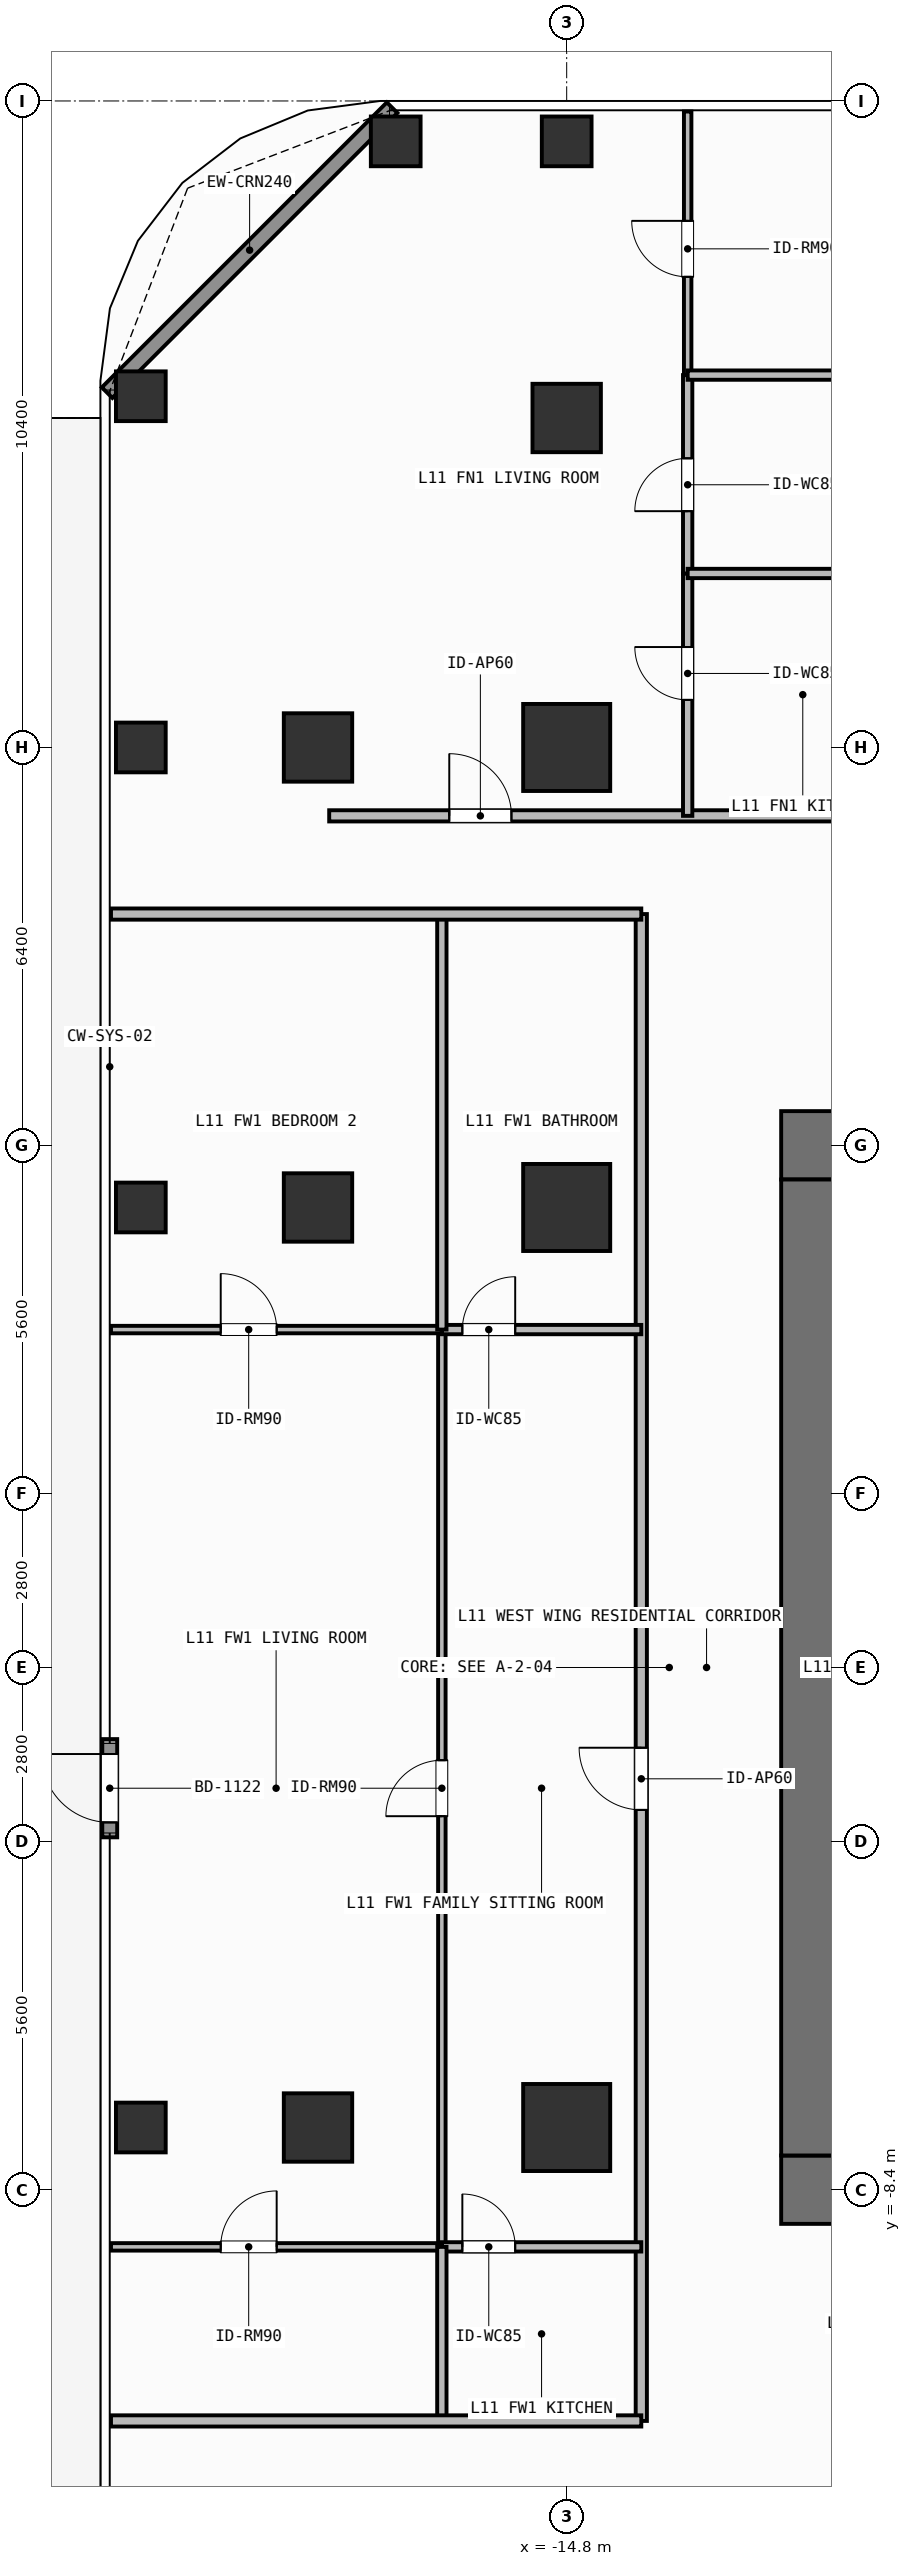
"""IFC4 building model, lengths in metres.
Left out: names, types, materials, properties, quantities, classifications, styles, units other than length and angle.
Written with IfcOpenShell. Run it as: python <this file> out.ifc"""

import sys

from ifc_helpers import new_model, si_unit, direction, frame, frame_2d, origin, origin_2d, place, context, subcontext, project, spatial, rectangle, hollow_rectangle, extrude, element, fill, save


model = new_model("IFC4")
c1 = context("Model", 3, precision=1e-05, world=origin(), true_north=direction((0.0, 1.0)))
c2 = subcontext(c1, "Body", "Model", "MODEL_VIEW")
j1 = project(units=[si_unit("LENGTHUNIT", "METRE"), si_unit("PLANEANGLEUNIT", "RADIAN")], contexts=[c1])
p1 = place(None, origin())
s1 = spatial("IfcSite", under=j1, at=p1, CompositionType="ELEMENT")
p2 = place(p1, origin())
s2 = spatial("IfcBuilding", under=s1, at=p2, CompositionType="ELEMENT")
p3 = place(p2, frame((0.0, 0.0, 42.3)))
s3 = spatial("IfcBuildingStorey", under=s2, at=p3, CompositionType="ELEMENT", Elevation=42.3)
for number, where, z_axis, x_axis in (
    (1, (-11.35, -8.4, 0.0), (0.0, 0.0, 1.0), (1.0, 0.0, 0.0)),
    (2, (-11.35, 8.4, 0.0), (0.0, 0.0, 1.0), (1.0, 0.0, 0.0)),
):
    element("IfcWall", number, at=place(p3, frame(where, z_axis=z_axis, x_axis=x_axis)), inside=s3, PredefinedType="SHEAR", context=c2, shape_type="SweptSolid", body=[
        extrude(rectangle(XDim=1.65, YDim=1.1, at=frame_2d((0.825, 0.0))), origin(), (0.0, 0.0, 1.0), 3.9),
    ])
p4 = place(p3, frame((-10.8, -7.85, 0.0), z_axis=(0.0, 0.0, 1.0), x_axis=(0.0, 1.0, 0.0)))
e3 = element("IfcWall", 3, at=p4, inside=s3, PredefinedType="SHEAR", context=c2, shape_type="SweptSolid", body=[
    extrude(rectangle(XDim=15.7, YDim=1.1, at=frame_2d((7.85, 0.0))), origin(), (0.0, 0.0, 1.0), 3.9),
])
for number, where, z_axis, x_axis in (
    (4, (-14.8, 14.8, 0.0), (0.0, 0.0, 1.0), (1.0, 0.0, 0.0)),
    (5, (-14.8, -7.4, 0.0), (0.0, 0.0, 1.0), (1.0, 0.0, 0.0)),
    (6, (-14.8, 7.4, 0.0), (0.0, 0.0, 1.0), (1.0, 0.0, 0.0)),
):
    element("IfcColumn", number, at=place(p3, frame(where, z_axis=z_axis, x_axis=x_axis)), inside=s3, PredefinedType="COLUMN", context=c2, shape_type="SweptSolid", body=[
        extrude(rectangle(XDim=1.4, YDim=1.4, at=origin_2d()), origin(), (0.0, 0.0, 1.0), 3.9),
    ])
for number, where, z_axis, x_axis in (
    (7, (-18.8, -7.4, 0.0), (0.0, 0.0, 1.0), (1.0, 0.0, 0.0)),
    (8, (-18.8, 7.4, 0.0), (0.0, 0.0, 1.0), (1.0, 0.0, 0.0)),
    (9, (-18.8, 14.8, 0.0), (0.0, 0.0, 1.0), (1.0, 0.0, 0.0)),
    (10, (-14.8, 20.1, 0.0), (0.0, 0.0, 1.0), (1.0, 0.0, 0.0)),
):
    element("IfcColumn", number, at=place(p3, frame(where, z_axis=z_axis, x_axis=x_axis)), inside=s3, PredefinedType="COLUMN", context=c2, shape_type="SweptSolid", body=[
        extrude(rectangle(XDim=1.1, YDim=1.1, at=origin_2d()), origin(), (0.0, 0.0, 1.0), 3.9),
    ])
for number, where, z_axis, x_axis in (
    (11, (-17.55, 24.55, 0.0), (0.0, 0.0, 1.0), (1.0, 0.0, 0.0)),
    (12, (-21.65, 20.45, 0.0), (0.0, 0.0, 1.0), (1.0, 0.0, 0.0)),
    (13, (-14.8, 24.55, 0.0), (0.0, 0.0, 1.0), (1.0, 0.0, 0.0)),
    (14, (-21.65, -7.4, 0.0), (0.0, 0.0, 1.0), (1.0, 0.0, 0.0)),
    (15, (-21.65, 7.4, 0.0), (0.0, 0.0, 1.0), (1.0, 0.0, 0.0)),
    (16, (-21.65, 14.8, 0.0), (0.0, 0.0, 1.0), (1.0, 0.0, 0.0)),
):
    element("IfcColumn", number, at=place(p3, frame(where, z_axis=z_axis, x_axis=x_axis)), inside=s3, PredefinedType="COLUMN", context=c2, shape_type="SweptSolid", body=[
        extrude(hollow_rectangle(XDim=0.8, YDim=0.8, WallThickness=0.036, at=origin_2d()), origin(), (0.0, 0.0, 1.0), 3.9),
    ])
p5 = place(p3, frame((-22.15, -2.732, 0.0), z_axis=(0.0, 0.0, 1.0), x_axis=(0.0, 1.0, 0.0)))
e17 = element("IfcWall", 17, at=p5, inside=s3, PredefinedType="SOLIDWALL", context=c2, shape_type="SweptSolid", body=[
    extrude(rectangle(XDim=1.58, YDim=0.24, at=frame_2d((0.79, 0.0))), origin(), (0.0, 0.0, 1.0), 3.68),
])
p6 = place(p5, frame((0.24, 0.0, 0.0)))
e18 = element("IfcOpeningElement", 18, at=p6, cuts=e17, PredefinedType="OPENING", context=c2, shape_type="SweptSolid", body=[
    extrude(rectangle(XDim=1.1, YDim=2.2, at=frame_2d((0.55, 1.1))), frame((0.0, 0.13, 0.0), z_axis=(0.0, -1.0, 0.0), x_axis=(1.0, 0.0, 0.0)), (0.0, 0.0, 1.0), 0.26),
])
p7 = place(p3, frame((-22.192, 20.508, 0.0), z_axis=(0.0, 0.0, 1.0), x_axis=(0.707106781187, 0.707106781187, 0.0)))
e19 = element("IfcWall", 19, at=p7, inside=s3, PredefinedType="SOLIDWALL", context=c2, shape_type="SweptSolid", body=[
    extrude(rectangle(XDim=6.484, YDim=0.24, at=frame_2d((3.242, 0.0))), origin(), (0.0, 0.0, 1.0), 3.68),
])
p8 = place(p3, frame((-18.62, 13.7, 0.0), z_axis=(0.0, 0.0, 1.0), x_axis=(1.0, 0.0, 0.0)))
e20 = element("IfcWall", 20, at=p8, inside=s3, PredefinedType="PARTITIONING", context=c2, shape_type="SweptSolid", body=[
    extrude(rectangle(XDim=9.469, YDim=0.18, at=frame_2d((4.735, 0.0))), origin(), (0.0, 0.0, 1.0), 3.68),
])
p9 = place(p8, frame((1.931, 0.0, 0.0)))
e21 = element("IfcOpeningElement", 21, at=p9, cuts=e20, PredefinedType="OPENING", context=c2, shape_type="SweptSolid", body=[
    extrude(rectangle(XDim=1.0, YDim=2.2, at=frame_2d((0.5, 1.1))), frame((0.0, 0.1, 0.0), z_axis=(0.0, -1.0, 0.0), x_axis=(1.0, 0.0, 0.0)), (0.0, 0.0, 1.0), 0.2),
])
p10 = place(p3, frame((-12.854, 13.7, 0.0), z_axis=(0.0, 0.0, 1.0), x_axis=(0.0, 1.0, 0.0)))
e22 = element("IfcWall", 22, at=p10, inside=s3, PredefinedType="PARTITIONING", context=c2, shape_type="SweptSolid", body=[
    extrude(rectangle(XDim=3.899, YDim=0.15, at=frame_2d((1.95, 0.0))), origin(), (0.0, 0.0, 1.0), 3.68),
])
p11 = place(p10, frame((1.865, 0.0, 0.0)))
e23 = element("IfcOpeningElement", 23, at=p11, cuts=e22, PredefinedType="OPENING", context=c2, shape_type="SweptSolid", body=[
    extrude(rectangle(XDim=0.85, YDim=2.1, at=frame_2d((0.425, 1.05))), frame((0.0, 0.085, 0.0), z_axis=(0.0, -1.0, 0.0), x_axis=(1.0, 0.0, 0.0)), (0.0, 0.0, 1.0), 0.17),
])
p12 = place(p3, frame((-12.854, 17.599, 0.0), z_axis=(0.0, 0.0, 1.0), x_axis=(0.0, 1.0, 0.0)))
e24 = element("IfcWall", 24, at=p12, inside=s3, PredefinedType="PARTITIONING", context=c2, shape_type="SweptSolid", body=[
    extrude(rectangle(XDim=3.191, YDim=0.15, at=frame_2d((1.595, 0.0))), origin(), (0.0, 0.0, 1.0), 3.68),
])
p13 = place(p12, frame((1.002, 0.0, 0.0)))
e25 = element("IfcOpeningElement", 25, at=p13, cuts=e24, PredefinedType="OPENING", context=c2, shape_type="SweptSolid", body=[
    extrude(rectangle(XDim=0.85, YDim=2.1, at=frame_2d((0.425, 1.05))), frame((0.0, 0.085, 0.0), z_axis=(0.0, -1.0, 0.0), x_axis=(1.0, 0.0, 0.0)), (0.0, 0.0, 1.0), 0.17),
])
p14 = place(p3, frame((-12.854, 20.79, 0.0), z_axis=(0.0, 0.0, 1.0), x_axis=(0.0, 1.0, 0.0)))
e26 = element("IfcWall", 26, at=p14, inside=s3, PredefinedType="PARTITIONING", context=c2, shape_type="SweptSolid", body=[
    extrude(rectangle(XDim=4.24, YDim=0.12, at=frame_2d((2.12, 0.0))), origin(), (0.0, 0.0, 1.0), 3.68),
])
p15 = place(p14, frame((1.581, 0.0, 0.0)))
e27 = element("IfcOpeningElement", 27, at=p15, cuts=e26, PredefinedType="OPENING", context=c2, shape_type="SweptSolid", body=[
    extrude(rectangle(XDim=0.9, YDim=2.1, at=frame_2d((0.45, 1.05))), frame((0.0, 0.07, 0.0), z_axis=(0.0, -1.0, 0.0), x_axis=(1.0, 0.0, 0.0)), (0.0, 0.0, 1.0), 0.14),
])
p16 = place(p3, frame((-13.6, -12.12, 0.0), z_axis=(0.0, 0.0, 1.0), x_axis=(0.0, 1.0, 0.0)))
e28 = element("IfcWall", 28, at=p16, inside=s3, PredefinedType="PARTITIONING", context=c2, shape_type="SweptSolid", body=[
    extrude(rectangle(XDim=24.24, YDim=0.18, at=frame_2d((12.12, 0.0))), origin(), (0.0, 0.0, 1.0), 3.68),
])
p17 = place(p16, frame((9.829, 0.0, 0.0)))
e29 = element("IfcOpeningElement", 29, at=p17, cuts=e28, PredefinedType="OPENING", context=c2, shape_type="SweptSolid", body=[
    extrude(rectangle(XDim=1.0, YDim=2.2, at=frame_2d((0.5, 1.1))), frame((0.0, 0.1, 0.0), z_axis=(0.0, -1.0, 0.0), x_axis=(1.0, 0.0, 0.0)), (0.0, 0.0, 1.0), 0.2),
])
p18 = place(p3, frame((-16.808, -9.32, 0.0), z_axis=(0.0, 0.0, 1.0), x_axis=(0.0, 1.0, 0.0)))
e30 = element("IfcWall", 30, at=p18, inside=s3, PredefinedType="PARTITIONING", context=c2, shape_type="SweptSolid", body=[
    extrude(rectangle(XDim=14.756, YDim=0.12, at=frame_2d((7.378, 0.0))), origin(), (0.0, 0.0, 1.0), 3.68),
])
p19 = place(p18, frame((6.928, 0.0, 0.0)))
e31 = element("IfcOpeningElement", 31, at=p19, cuts=e30, PredefinedType="OPENING", context=c2, shape_type="SweptSolid", body=[
    extrude(rectangle(XDim=0.9, YDim=2.1, at=frame_2d((0.45, 1.05))), frame((0.0, 0.07, 0.0), z_axis=(0.0, -1.0, 0.0), x_axis=(1.0, 0.0, 0.0)), (0.0, 0.0, 1.0), 0.14),
])
p20 = place(p3, frame((-16.808, 5.436, 0.0), z_axis=(0.0, 0.0, 1.0), x_axis=(1.0, 0.0, 0.0)))
e32 = element("IfcWall", 32, at=p20, inside=s3, PredefinedType="PARTITIONING", context=c2, shape_type="SweptSolid", body=[
    extrude(rectangle(XDim=3.208, YDim=0.15, at=frame_2d((1.604, 0.0))), origin(), (0.0, 0.0, 1.0), 3.68),
])
p21 = place(p20, frame((0.33, 0.0, 0.0)))
e33 = element("IfcOpeningElement", 33, at=p21, cuts=e32, PredefinedType="OPENING", context=c2, shape_type="SweptSolid", body=[
    extrude(rectangle(XDim=0.85, YDim=2.1, at=frame_2d((0.425, 1.05))), frame((0.0, 0.085, 0.0), z_axis=(0.0, -1.0, 0.0), x_axis=(1.0, 0.0, 0.0)), (0.0, 0.0, 1.0), 0.17),
])
p22 = place(p3, frame((-16.808, -9.32, 0.0), z_axis=(0.0, 0.0, 1.0), x_axis=(1.0, 0.0, 0.0)))
e34 = element("IfcWall", 34, at=p22, inside=s3, PredefinedType="PARTITIONING", context=c2, shape_type="SweptSolid", body=[
    extrude(rectangle(XDim=3.208, YDim=0.15, at=frame_2d((1.604, 0.0))), origin(), (0.0, 0.0, 1.0), 3.68),
])
p23 = place(p22, frame((0.33, 0.0, 0.0)))
e35 = element("IfcOpeningElement", 35, at=p23, cuts=e34, PredefinedType="OPENING", context=c2, shape_type="SweptSolid", body=[
    extrude(rectangle(XDim=0.85, YDim=2.1, at=frame_2d((0.425, 1.05))), frame((0.0, 0.085, 0.0), z_axis=(0.0, -1.0, 0.0), x_axis=(1.0, 0.0, 0.0)), (0.0, 0.0, 1.0), 0.17),
])
p24 = place(p3, frame((-22.13, -9.32, 0.0), z_axis=(0.0, 0.0, 1.0), x_axis=(1.0, 0.0, 0.0)))
e36 = element("IfcWall", 36, at=p24, inside=s3, PredefinedType="PARTITIONING", context=c2, shape_type="SweptSolid", body=[
    extrude(rectangle(XDim=5.322, YDim=0.12, at=frame_2d((2.661, 0.0))), origin(), (0.0, 0.0, 1.0), 3.68),
])
p25 = place(p24, frame((1.765, 0.0, 0.0)))
e37 = element("IfcOpeningElement", 37, at=p25, cuts=e36, PredefinedType="OPENING", context=c2, shape_type="SweptSolid", body=[
    extrude(rectangle(XDim=0.9, YDim=2.1, at=frame_2d((0.45, 1.05))), frame((0.0, 0.07, 0.0), z_axis=(0.0, -1.0, 0.0), x_axis=(1.0, 0.0, 0.0)), (0.0, 0.0, 1.0), 0.14),
])
p26 = place(p3, frame((-22.13, 5.436, 0.0), z_axis=(0.0, 0.0, 1.0), x_axis=(1.0, 0.0, 0.0)))
e38 = element("IfcWall", 38, at=p26, inside=s3, PredefinedType="PARTITIONING", context=c2, shape_type="SweptSolid", body=[
    extrude(rectangle(XDim=5.322, YDim=0.12, at=frame_2d((2.661, 0.0))), origin(), (0.0, 0.0, 1.0), 3.68),
])
p27 = place(p26, frame((1.765, 0.0, 0.0)))
e39 = element("IfcOpeningElement", 39, at=p27, cuts=e38, PredefinedType="OPENING", context=c2, shape_type="SweptSolid", body=[
    extrude(rectangle(XDim=0.9, YDim=2.1, at=frame_2d((0.45, 1.05))), frame((0.0, 0.07, 0.0), z_axis=(0.0, -1.0, 0.0), x_axis=(1.0, 0.0, 0.0)), (0.0, 0.0, 1.0), 0.14),
])
for number, where, z_axis, x_axis in (
    (40, (-12.854, 17.599, 0.0), (0.0, 0.0, 1.0), (1.0, 0.0, 0.0)),
    (41, (-12.854, 20.79, 0.0), (0.0, 0.0, 1.0), (1.0, 0.0, 0.0)),
):
    element("IfcWall", number, at=place(p3, frame(where, z_axis=z_axis, x_axis=x_axis)), inside=s3, PredefinedType="PARTITIONING", context=c2, shape_type="SweptSolid", body=[
        extrude(rectangle(XDim=3.703, YDim=0.15, at=frame_2d((1.852, 0.0))), origin(), (0.0, 0.0, 1.0), 3.68),
    ])
p28 = place(p3, frame((-16.808, -12.12, 0.0), z_axis=(0.0, 0.0, 1.0), x_axis=(0.0, 1.0, 0.0)))
e42 = element("IfcWall", 42, at=p28, inside=s3, PredefinedType="PARTITIONING", context=c2, shape_type="SweptSolid", body=[
    extrude(rectangle(XDim=2.8, YDim=0.15, at=frame_2d((1.4, 0.0))), origin(), (0.0, 0.0, 1.0), 3.68),
])
p29 = place(p3, frame((-16.808, 5.436, 0.0), z_axis=(0.0, 0.0, 1.0), x_axis=(0.0, 1.0, 0.0)))
e43 = element("IfcWall", 43, at=p29, inside=s3, PredefinedType="PARTITIONING", context=c2, shape_type="SweptSolid", body=[
    extrude(rectangle(XDim=6.684, YDim=0.15, at=frame_2d((3.342, 0.0))), origin(), (0.0, 0.0, 1.0), 3.68),
])
for number, where, z_axis, x_axis in (
    (44, (-22.13, -12.12, 0.0), (0.0, 0.0, 1.0), (1.0, 0.0, 0.0)),
    (45, (-22.13, 12.12, 0.0), (0.0, 0.0, 1.0), (1.0, 0.0, 0.0)),
):
    element("IfcWall", number, at=place(p3, frame(where, z_axis=z_axis, x_axis=x_axis)), inside=s3, PredefinedType="PARTITIONING", context=c2, shape_type="SweptSolid", body=[
        extrude(rectangle(XDim=8.53, YDim=0.18, at=frame_2d((4.265, 0.0))), origin(), (0.0, 0.0, 1.0), 3.68),
    ])
p30 = place(p6, origin())
e46 = element("IfcDoor", 46, at=p30, inside=s3, OperationType="SINGLE_SWING_RIGHT", PredefinedType="DOOR", context=c2, shape_type="SweptSolid", body=[
    extrude(rectangle(XDim=1.1, YDim=2.2, at=frame_2d((0.55, 1.1))), frame((0.0, 0.025, 0.0), z_axis=(0.0, -1.0, 0.0), x_axis=(1.0, 0.0, 0.0)), (0.0, 0.0, 1.0), 0.05),
])
fill(e18, e46)
p31 = place(p9, origin())
e47 = element("IfcDoor", 47, at=p31, inside=s3, OperationType="SINGLE_SWING_LEFT", PredefinedType="DOOR", context=c2, shape_type="SweptSolid", body=[
    extrude(rectangle(XDim=1.0, YDim=2.2, at=frame_2d((0.5, 1.1))), frame((0.0, 0.025, 0.0), z_axis=(0.0, -1.0, 0.0), x_axis=(1.0, 0.0, 0.0)), (0.0, 0.0, 1.0), 0.05),
])
fill(e21, e47)
p32 = place(p11, origin())
e48 = element("IfcDoor", 48, at=p32, inside=s3, OperationType="SINGLE_SWING_RIGHT", PredefinedType="DOOR", context=c2, shape_type="SweptSolid", body=[
    extrude(rectangle(XDim=0.85, YDim=2.1, at=frame_2d((0.425, 1.05))), frame((0.0, 0.025, 0.0), z_axis=(0.0, -1.0, 0.0), x_axis=(1.0, 0.0, 0.0)), (0.0, 0.0, 1.0), 0.05),
])
fill(e23, e48)
p33 = place(p13, origin())
e49 = element("IfcDoor", 49, at=p33, inside=s3, OperationType="SINGLE_SWING_LEFT", PredefinedType="DOOR", context=c2, shape_type="SweptSolid", body=[
    extrude(rectangle(XDim=0.85, YDim=2.1, at=frame_2d((0.425, 1.05))), frame((0.0, 0.025, 0.0), z_axis=(0.0, -1.0, 0.0), x_axis=(1.0, 0.0, 0.0)), (0.0, 0.0, 1.0), 0.05),
])
fill(e25, e49)
p34 = place(p15, origin())
e50 = element("IfcDoor", 50, at=p34, inside=s3, OperationType="SINGLE_SWING_RIGHT", PredefinedType="DOOR", context=c2, shape_type="SweptSolid", body=[
    extrude(rectangle(XDim=0.9, YDim=2.1, at=frame_2d((0.45, 1.05))), frame((0.0, 0.025, 0.0), z_axis=(0.0, -1.0, 0.0), x_axis=(1.0, 0.0, 0.0)), (0.0, 0.0, 1.0), 0.05),
])
fill(e27, e50)
p35 = place(p17, origin())
e51 = element("IfcDoor", 51, at=p35, inside=s3, OperationType="SINGLE_SWING_RIGHT", PredefinedType="DOOR", context=c2, shape_type="SweptSolid", body=[
    extrude(rectangle(XDim=1.0, YDim=2.2, at=frame_2d((0.5, 1.1))), frame((0.0, 0.025, 0.0), z_axis=(0.0, -1.0, 0.0), x_axis=(1.0, 0.0, 0.0)), (0.0, 0.0, 1.0), 0.05),
])
fill(e29, e51)
p36 = place(p19, origin())
e52 = element("IfcDoor", 52, at=p36, inside=s3, OperationType="SINGLE_SWING_LEFT", PredefinedType="DOOR", context=c2, shape_type="SweptSolid", body=[
    extrude(rectangle(XDim=0.9, YDim=2.1, at=frame_2d((0.45, 1.05))), frame((0.0, 0.025, 0.0), z_axis=(0.0, -1.0, 0.0), x_axis=(1.0, 0.0, 0.0)), (0.0, 0.0, 1.0), 0.05),
])
fill(e31, e52)
p37 = place(p21, origin())
e53 = element("IfcDoor", 53, at=p37, inside=s3, OperationType="SINGLE_SWING_RIGHT", PredefinedType="DOOR", context=c2, shape_type="SweptSolid", body=[
    extrude(rectangle(XDim=0.85, YDim=2.1, at=frame_2d((0.425, 1.05))), frame((0.0, 0.025, 0.0), z_axis=(0.0, -1.0, 0.0), x_axis=(1.0, 0.0, 0.0)), (0.0, 0.0, 1.0), 0.05),
])
fill(e33, e53)
p38 = place(p23, origin())
e54 = element("IfcDoor", 54, at=p38, inside=s3, OperationType="SINGLE_SWING_LEFT", PredefinedType="DOOR", context=c2, shape_type="SweptSolid", body=[
    extrude(rectangle(XDim=0.85, YDim=2.1, at=frame_2d((0.425, 1.05))), frame((0.0, 0.025, 0.0), z_axis=(0.0, -1.0, 0.0), x_axis=(1.0, 0.0, 0.0)), (0.0, 0.0, 1.0), 0.05),
])
fill(e35, e54)
p39 = place(p25, origin())
e55 = element("IfcDoor", 55, at=p39, inside=s3, OperationType="SINGLE_SWING_RIGHT", PredefinedType="DOOR", context=c2, shape_type="SweptSolid", body=[
    extrude(rectangle(XDim=0.9, YDim=2.1, at=frame_2d((0.45, 1.05))), frame((0.0, 0.025, 0.0), z_axis=(0.0, -1.0, 0.0), x_axis=(1.0, 0.0, 0.0)), (0.0, 0.0, 1.0), 0.05),
])
fill(e37, e55)
p40 = place(p27, origin())
e56 = element("IfcDoor", 56, at=p40, inside=s3, OperationType="SINGLE_SWING_LEFT", PredefinedType="DOOR", context=c2, shape_type="SweptSolid", body=[
    extrude(rectangle(XDim=0.9, YDim=2.1, at=frame_2d((0.45, 1.05))), frame((0.0, 0.025, 0.0), z_axis=(0.0, -1.0, 0.0), x_axis=(1.0, 0.0, 0.0)), (0.0, 0.0, 1.0), 0.05),
])
fill(e39, e56)
save(model, sys.argv[1])
